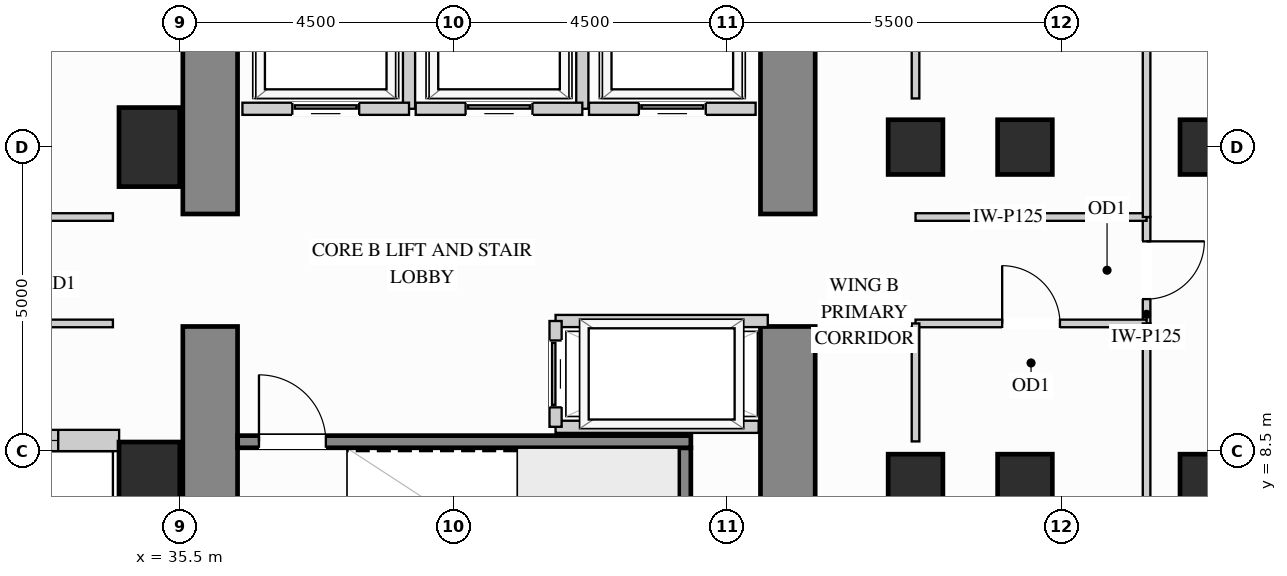
"""IFC4 building model, lengths in metres.
Left out: names, types, materials, properties, quantities, classifications, styles, units other than length and angle.
Written with IfcOpenShell. Run it as: python <this file> out.ifc"""

import sys

from ifc_helpers import new_model, si_unit, direction, frame, frame_2d, origin, origin_2d, place, context, subcontext, project, spatial, rectangle, extrude, source, transform, mapped, element, fill, save


model = new_model("IFC4")
c1 = context("Model", 3, precision=1e-05, world=origin(), true_north=direction((0.0, 1.0)))
c2 = subcontext(c1, "Body", "Model", "MODEL_VIEW")
j1 = project(units=[si_unit("LENGTHUNIT", "METRE"), si_unit("PLANEANGLEUNIT", "RADIAN")], contexts=[c1])
p1 = place(None, origin())
s1 = spatial("IfcSite", under=j1, at=p1, CompositionType="ELEMENT")
p2 = place(p1, origin())
s2 = spatial("IfcBuilding", under=s1, at=p2, CompositionType="ELEMENT")
p3 = place(p2, frame((0.0, 0.0, 47.7)))
s3 = spatial("IfcBuildingStorey", under=s2, at=p3, CompositionType="ELEMENT", Elevation=47.7)
m1 = source(origin(), c2, "Body", "SweptSolid", [
    extrude(rectangle(XDim=0.9, YDim=0.9, at=origin_2d()), origin(), (0.0, 0.0, 1.0), 3.38),
])
for number, where, z_axis, x_axis in (
    (1, (47.6, 13.5, 0.0), (0.0, 0.0, 1.0), (1.0, 0.0, 0.0)),
    (2, (47.6, 8.0, 0.0), (0.0, 0.0, 1.0), (1.0, 0.0, 0.0)),
    (3, (49.4, 13.5, 0.0), (0.0, 0.0, 1.0), (1.0, 0.0, 0.0)),
    (4, (49.4, 8.0, 0.0), (0.0, 0.0, 1.0), (1.0, 0.0, 0.0)),
    (5, (52.4, 13.5, 0.0), (0.0, 0.0, 1.0), (1.0, 0.0, 0.0)),
    (6, (52.4, 8.0, 0.0), (0.0, 0.0, 1.0), (1.0, 0.0, 0.0)),
):
    element("IfcColumn", number, at=place(p3, frame(where, z_axis=z_axis, x_axis=x_axis)), inside=s3, PredefinedType="COLUMN", context=c2, shape_type="MappedRepresentation", body=[
        mapped(m1, transform((0.0, 0.0, 0.0), x_axis=(1.0, 0.0, 0.0), y_axis=(0.0, 1.0, 0.0), z_axis=(0.0, 0.0, 1.0))),
    ])
m2 = source(origin(), c2, "Body", "SweptSolid", [
    extrude(rectangle(XDim=1.0, YDim=1.3, at=origin_2d()), origin(), (0.0, 0.0, 1.0), 3.38),
])
for number, where, z_axis, x_axis in (
    (7, (35.0, 13.5, 0.0), (0.0, 0.0, 1.0), (1.0, 0.0, 0.0)),
    (8, (35.0, 8.0, 0.0), (0.0, 0.0, 1.0), (1.0, 0.0, 0.0)),
):
    element("IfcColumn", number, at=place(p3, frame(where, z_axis=z_axis, x_axis=x_axis)), inside=s3, PredefinedType="COLUMN", context=c2, shape_type="MappedRepresentation", body=[
        mapped(m2, transform((0.0, 0.0, 0.0), x_axis=(1.0, 0.0, 0.0), y_axis=(0.0, 1.0, 0.0), z_axis=(0.0, 0.0, 1.0))),
    ])
m3 = source(origin(), c2, "Body", "SweptSolid", [
    extrude(rectangle(XDim=5.6, YDim=0.9, at=frame_2d((2.8, 0.0))), origin(), (0.0, 0.0, 1.0), 3.38),
])
p4 = place(p3, frame((45.5, 4.95, 0.0), z_axis=(0.0, 0.0, 1.0), x_axis=(0.0, 1.0, 0.0)))
e9 = element("IfcWall", 9, at=p4, inside=s3, PredefinedType="SHEAR", context=c2, shape_type="MappedRepresentation", body=[
    mapped(m3, transform((0.0, 0.0, 0.0), x_axis=(1.0, 0.0, 0.0), y_axis=(0.0, 1.0, 0.0), z_axis=(0.0, 0.0, 1.0))),
])
m4 = source(origin(), c2, "Body", "SweptSolid", [
    extrude(rectangle(XDim=3.65, YDim=0.9, at=frame_2d((1.825, 0.0))), origin(), (0.0, 0.0, 1.0), 3.38),
])
p5 = place(p3, frame((45.5, 12.4, 0.0), z_axis=(0.0, 0.0, 1.0), x_axis=(0.0, 1.0, 0.0)))
e10 = element("IfcWall", 10, at=p5, inside=s3, PredefinedType="SHEAR", context=c2, shape_type="MappedRepresentation", body=[
    mapped(m4, transform((0.0, 0.0, 0.0), x_axis=(1.0, 0.0, 0.0), y_axis=(0.0, 1.0, 0.0), z_axis=(0.0, 0.0, 1.0))),
])
p6 = place(p3, frame((36.0, 4.95, 0.0), z_axis=(0.0, 0.0, 1.0), x_axis=(0.0, 1.0, 0.0)))
e11 = element("IfcWall", 11, at=p6, inside=s3, PredefinedType="SHEAR", context=c2, shape_type="MappedRepresentation", body=[
    mapped(m3, transform((0.0, 0.0, 0.0), x_axis=(1.0, 0.0, 0.0), y_axis=(0.0, 1.0, 0.0), z_axis=(0.0, 0.0, 1.0))),
])
p7 = place(p3, frame((36.0, 12.4, 0.0), z_axis=(0.0, 0.0, 1.0), x_axis=(0.0, 1.0, 0.0)))
e12 = element("IfcWall", 12, at=p7, inside=s3, PredefinedType="SHEAR", context=c2, shape_type="MappedRepresentation", body=[
    mapped(m4, transform((0.0, 0.0, 0.0), x_axis=(1.0, 0.0, 0.0), y_axis=(0.0, 1.0, 0.0), z_axis=(0.0, 0.0, 1.0))),
])
p8 = place(p3, frame((30.998, 8.675, 0.0), z_axis=(0.0, 0.0, 1.0), x_axis=(1.0, 0.0, 0.0)))
e13 = element("IfcWall", 13, at=p8, inside=s3, PredefinedType="SOLIDWALL", context=c2, shape_type="SweptSolid", body=[
    extrude(rectangle(XDim=3.504, YDim=0.35, at=frame_2d((1.752, 0.0))), origin(), (0.0, 0.0, 1.0), 3.365),
])
p9 = place(p8, frame((1.002, 0.0, 0.78)))
e14 = element("IfcOpeningElement", 14, at=p9, cuts=e13, PredefinedType="OPENING", context=c2, shape_type="SweptSolid", body=[
    extrude(rectangle(XDim=1.5, YDim=2.0, at=frame_2d((0.75, 1.0))), frame((0.0, 0.185, 0.0), z_axis=(0.0, -1.0, 0.0), x_axis=(1.0, 0.0, 0.0)), (0.0, 0.0, 1.0), 0.37),
])
p10 = place(p3, frame((51.4, 10.6, 0.0), z_axis=(0.0, 0.0, 1.0), x_axis=(0.0, 1.0, 0.0)))
e15 = element("IfcWall", 15, at=p10, inside=s3, PredefinedType="PARTITIONING", context=c2, shape_type="SweptSolid", body=[
    extrude(rectangle(XDim=1.75, YDim=0.125, at=frame_2d((0.875, 0.0))), origin(), (0.0, 0.0, 1.0), 3.365),
])
p11 = place(p10, frame((0.4, 0.0, 0.0)))
e16 = element("IfcOpeningElement", 16, at=p11, cuts=e15, PredefinedType="OPENING", context=c2, shape_type="SweptSolid", body=[
    extrude(rectangle(XDim=0.95, YDim=2.15, at=frame_2d((0.475, 1.075))), frame((0.0, 0.073, 0.0), z_axis=(0.0, -1.0, 0.0), x_axis=(1.0, 0.0, 0.0)), (0.0, 0.0, 1.0), 0.145),
])
m5 = source(origin(), c2, "Body", "SweptSolid", [
    extrude(rectangle(XDim=3.8, YDim=0.125, at=frame_2d((1.9, 0.0))), origin(), (0.0, 0.0, 1.0), 3.365),
])
p12 = place(p3, frame((47.6, 12.35, 0.0), z_axis=(0.0, 0.0, 1.0), x_axis=(1.0, 0.0, 0.0)))
e17 = element("IfcWall", 17, at=p12, inside=s3, PredefinedType="PARTITIONING", context=c2, shape_type="MappedRepresentation", body=[
    mapped(m5, transform((0.0, 0.0, 0.0), x_axis=(1.0, 0.0, 0.0), y_axis=(0.0, 1.0, 0.0), z_axis=(0.0, 0.0, 1.0))),
])
p13 = place(p3, frame((47.6, 10.6, 0.0), z_axis=(0.0, 0.0, 1.0), x_axis=(1.0, 0.0, 0.0)))
e18 = element("IfcWall", 18, at=p13, inside=s3, PredefinedType="PARTITIONING", context=c2, shape_type="SweptSolid", body=[
    extrude(rectangle(XDim=3.8, YDim=0.125, at=frame_2d((1.9, 0.0))), origin(), (0.0, 0.0, 1.0), 2.67),
])
p14 = place(p13, frame((1.425, 0.0, 0.0)))
e19 = element("IfcOpeningElement", 19, at=p14, cuts=e18, PredefinedType="OPENING", context=c2, shape_type="SweptSolid", body=[
    extrude(rectangle(XDim=0.95, YDim=2.15, at=frame_2d((0.475, 1.075))), frame((0.0, 0.073, 0.0), z_axis=(0.0, -1.0, 0.0), x_axis=(1.0, 0.0, 0.0)), (0.0, 0.0, 1.0), 0.145),
])
m6 = source(origin(), c2, "Body", "SweptSolid", [
    extrude(rectangle(XDim=3.45, YDim=0.125, at=frame_2d((1.725, 0.0))), origin(), (0.0, 0.0, 1.0), 3.365),
])
p15 = place(p3, frame((51.4, 7.15, 0.0), z_axis=(0.0, 0.0, 1.0), x_axis=(0.0, 1.0, 0.0)))
e20 = element("IfcWall", 20, at=p15, inside=s3, PredefinedType="PARTITIONING", context=c2, shape_type="MappedRepresentation", body=[
    mapped(m6, transform((0.0, 0.0, 0.0), x_axis=(1.0, 0.0, 0.0), y_axis=(0.0, 1.0, 0.0), z_axis=(0.0, 0.0, 1.0))),
])
m7 = source(origin(), c2, "Body", "SweptSolid", [
    extrude(rectangle(XDim=9.79, YDim=0.125, at=frame_2d((4.895, 0.0))), origin(), (0.0, 0.0, 1.0), 3.365),
])
p16 = place(p3, frame((51.4, 12.35, 0.0), z_axis=(0.0, 0.0, 1.0), x_axis=(0.0, 1.0, 0.0)))
e21 = element("IfcWall", 21, at=p16, inside=s3, PredefinedType="PARTITIONING", context=c2, shape_type="MappedRepresentation", body=[
    mapped(m7, transform((0.0, 0.0, 0.0), x_axis=(1.0, 0.0, 0.0), y_axis=(0.0, 1.0, 0.0), z_axis=(0.0, 0.0, 1.0))),
])
m8 = source(origin(), c2, "Body", "SweptSolid", [
    extrude(rectangle(XDim=1.94, YDim=0.125, at=frame_2d((0.97, 0.0))), origin(), (0.0, 0.0, 1.0), 2.67),
])
p17 = place(p3, frame((47.6, 8.66, 0.0), z_axis=(0.0, 0.0, 1.0), x_axis=(0.0, 1.0, 0.0)))
e22 = element("IfcWall", 22, at=p17, inside=s3, PredefinedType="PARTITIONING", context=c2, shape_type="MappedRepresentation", body=[
    mapped(m8, transform((0.0, 0.0, 0.0), x_axis=(1.0, 0.0, 0.0), y_axis=(0.0, 1.0, 0.0), z_axis=(0.0, 0.0, 1.0))),
])
m9 = source(origin(), c2, "Body", "SweptSolid", [
    extrude(rectangle(XDim=2.44, YDim=0.125, at=frame_2d((1.22, 0.0))), origin(), (0.0, 0.0, 1.0), 2.67),
])
p18 = place(p3, frame((47.6, 14.3, 0.0), z_axis=(0.0, 0.0, 1.0), x_axis=(0.0, 1.0, 0.0)))
e23 = element("IfcWall", 23, at=p18, inside=s3, PredefinedType="PARTITIONING", context=c2, shape_type="MappedRepresentation", body=[
    mapped(m9, transform((0.0, 0.0, 0.0), x_axis=(1.0, 0.0, 0.0), y_axis=(0.0, 1.0, 0.0), z_axis=(0.0, 0.0, 1.0))),
])
p19 = place(p3, frame((29.85, 12.35, 0.0), z_axis=(0.0, 0.0, 1.0), x_axis=(1.0, 0.0, 0.0)))
e24 = element("IfcWall", 24, at=p19, inside=s3, PredefinedType="PARTITIONING", context=c2, shape_type="SweptSolid", body=[
    extrude(rectangle(XDim=4.55, YDim=0.125, at=frame_2d((2.275, 0.0))), origin(), (0.0, 0.0, 1.0), 3.365),
])
p20 = place(p19, frame((1.8, 0.0, 0.0)))
e25 = element("IfcOpeningElement", 25, at=p20, cuts=e24, PredefinedType="OPENING", context=c2, shape_type="SweptSolid", body=[
    extrude(rectangle(XDim=0.95, YDim=2.15, at=frame_2d((0.475, 1.075))), frame((0.0, 0.073, 0.0), z_axis=(0.0, -1.0, 0.0), x_axis=(1.0, 0.0, 0.0)), (0.0, 0.0, 1.0), 0.145),
])
p21 = place(p3, frame((26.95, 10.6, 0.0), z_axis=(0.0, 0.0, 1.0), x_axis=(1.0, 0.0, 0.0)))
e26 = element("IfcWall", 26, at=p21, inside=s3, PredefinedType="PARTITIONING", context=c2, shape_type="SweptSolid", body=[
    extrude(rectangle(XDim=7.45, YDim=0.125, at=frame_2d((3.725, 0.0))), origin(), (0.0, 0.0, 1.0), 3.365),
])
p22 = place(p21, frame((4.683, 0.0, 0.0)))
e27 = element("IfcOpeningElement", 27, at=p22, cuts=e26, PredefinedType="OPENING", context=c2, shape_type="SweptSolid", body=[
    extrude(rectangle(XDim=0.95, YDim=2.15, at=frame_2d((0.475, 1.075))), frame((0.0, 0.073, 0.0), z_axis=(0.0, -1.0, 0.0), x_axis=(1.0, 0.0, 0.0)), (0.0, 0.0, 1.0), 0.145),
])
m10 = source(origin(), c2, "Body", "SweptSolid", [
    extrude(rectangle(XDim=1.89, YDim=0.2, at=frame_2d((0.945, 0.0))), origin(), (0.0, 0.0, 1.0), 3.365),
])
p23 = place(p3, frame((39.27, 14.13, 0.0), z_axis=(0.0, 0.0, 1.0), x_axis=(0.0, 1.0, 0.0)))
e28 = element("IfcWall", 28, at=p23, inside=s3, PredefinedType="PARTITIONING", context=c2, shape_type="MappedRepresentation", body=[
    mapped(m10, transform((0.0, 0.0, 0.0), x_axis=(1.0, 0.0, 0.0), y_axis=(0.0, 1.0, 0.0), z_axis=(0.0, 0.0, 1.0))),
])
p24 = place(p3, frame((36.53, 14.13, 0.0), z_axis=(0.0, 0.0, 1.0), x_axis=(1.0, 0.0, 0.0)))
e29 = element("IfcWall", 29, at=p24, inside=s3, PredefinedType="PARTITIONING", context=c2, shape_type="SweptSolid", body=[
    extrude(rectangle(XDim=2.74, YDim=0.2, at=frame_2d((1.37, 0.0))), origin(), (0.0, 0.0, 1.0), 3.365),
])
p25 = place(p24, frame((0.82, 0.0, 0.0)))
e30 = element("IfcOpeningElement", 30, at=p25, cuts=e29, PredefinedType="OPENING", context=c2, shape_type="SweptSolid", body=[
    extrude(rectangle(XDim=1.1, YDim=2.2, at=frame_2d((0.55, 1.1))), frame((0.0, 0.11, 0.0), z_axis=(0.0, -1.0, 0.0), x_axis=(1.0, 0.0, 0.0)), (0.0, 0.0, 1.0), 0.22),
])
p26 = place(p3, frame((42.12, 14.13, 0.0), z_axis=(0.0, 0.0, 1.0), x_axis=(0.0, 1.0, 0.0)))
e31 = element("IfcWall", 31, at=p26, inside=s3, PredefinedType="PARTITIONING", context=c2, shape_type="MappedRepresentation", body=[
    mapped(m10, transform((0.0, 0.0, 0.0), x_axis=(1.0, 0.0, 0.0), y_axis=(0.0, 1.0, 0.0), z_axis=(0.0, 0.0, 1.0))),
])
p27 = place(p3, frame((39.38, 14.13, 0.0), z_axis=(0.0, 0.0, 1.0), x_axis=(1.0, 0.0, 0.0)))
e32 = element("IfcWall", 32, at=p27, inside=s3, PredefinedType="PARTITIONING", context=c2, shape_type="SweptSolid", body=[
    extrude(rectangle(XDim=2.74, YDim=0.2, at=frame_2d((1.37, 0.0))), origin(), (0.0, 0.0, 1.0), 3.365),
])
p28 = place(p27, frame((0.82, 0.0, 0.0)))
e33 = element("IfcOpeningElement", 33, at=p28, cuts=e32, PredefinedType="OPENING", context=c2, shape_type="SweptSolid", body=[
    extrude(rectangle(XDim=1.1, YDim=2.2, at=frame_2d((0.55, 1.1))), frame((0.0, 0.11, 0.0), z_axis=(0.0, -1.0, 0.0), x_axis=(1.0, 0.0, 0.0)), (0.0, 0.0, 1.0), 0.22),
])
p29 = place(p3, frame((42.23, 14.13, 0.0), z_axis=(0.0, 0.0, 1.0), x_axis=(1.0, 0.0, 0.0)))
e34 = element("IfcWall", 34, at=p29, inside=s3, PredefinedType="PARTITIONING", context=c2, shape_type="SweptSolid", body=[
    extrude(rectangle(XDim=2.74, YDim=0.2, at=frame_2d((1.37, 0.0))), origin(), (0.0, 0.0, 1.0), 3.365),
])
p30 = place(p29, frame((0.82, 0.0, 0.0)))
e35 = element("IfcOpeningElement", 35, at=p30, cuts=e34, PredefinedType="OPENING", context=c2, shape_type="SweptSolid", body=[
    extrude(rectangle(XDim=1.1, YDim=2.2, at=frame_2d((0.55, 1.1))), frame((0.0, 0.11, 0.0), z_axis=(0.0, -1.0, 0.0), x_axis=(1.0, 0.0, 0.0)), (0.0, 0.0, 1.0), 0.22),
])
m11 = source(origin(), c2, "Body", "SweptSolid", [
    extrude(rectangle(XDim=3.49, YDim=0.2, at=frame_2d((1.745, 0.0))), origin(), (0.0, 0.0, 1.0), 3.365),
])
p31 = place(p3, frame((41.68, 10.64, 0.0), z_axis=(0.0, 0.0, 1.0), x_axis=(1.0, 0.0, 0.0)))
e36 = element("IfcWall", 36, at=p31, inside=s3, PredefinedType="PARTITIONING", context=c2, shape_type="MappedRepresentation", body=[
    mapped(m11, transform((0.0, 0.0, 0.0), x_axis=(1.0, 0.0, 0.0), y_axis=(0.0, 1.0, 0.0), z_axis=(0.0, 0.0, 1.0))),
])
m12 = source(origin(), c2, "Body", "SweptSolid", [
    extrude(rectangle(XDim=3.34, YDim=0.2, at=frame_2d((1.67, 0.0))), origin(), (0.0, 0.0, 1.0), 3.365),
])
p32 = place(p3, frame((41.68, 8.9, 0.0), z_axis=(0.0, 0.0, 1.0), x_axis=(1.0, 0.0, 0.0)))
e37 = element("IfcWall", 37, at=p32, inside=s3, PredefinedType="PARTITIONING", context=c2, shape_type="MappedRepresentation", body=[
    mapped(m12, transform((0.0, 0.0, 0.0), x_axis=(1.0, 0.0, 0.0), y_axis=(0.0, 1.0, 0.0), z_axis=(0.0, 0.0, 1.0))),
])
p33 = place(p3, frame((41.68, 8.9, 0.0), z_axis=(0.0, 0.0, 1.0), x_axis=(0.0, 1.0, 0.0)))
e38 = element("IfcWall", 38, at=p33, inside=s3, PredefinedType="PARTITIONING", context=c2, shape_type="SweptSolid", body=[
    extrude(rectangle(XDim=1.74, YDim=0.2, at=frame_2d((0.87, 0.0))), origin(), (0.0, 0.0, 1.0), 3.365),
])
p34 = place(p33, frame((0.32, 0.0, 0.0)))
e39 = element("IfcOpeningElement", 39, at=p34, cuts=e38, PredefinedType="OPENING", context=c2, shape_type="SweptSolid", body=[
    extrude(rectangle(XDim=1.1, YDim=2.2, at=frame_2d((0.55, 1.1))), frame((0.0, 0.11, 0.0), z_axis=(0.0, -1.0, 0.0), x_axis=(1.0, 0.0, 0.0)), (0.0, 0.0, 1.0), 0.22),
])
m13 = source(origin(), c2, "Body", "SweptSolid", [
    extrude(rectangle(XDim=3.603, YDim=0.2, at=frame_2d((1.802, 0.0))), origin(), (0.0, 0.0, 1.0), 3.38),
])
p35 = place(p3, frame((43.805, 4.952, 0.0), z_axis=(0.0, 0.0, 1.0), x_axis=(0.0, 1.0, 0.0)))
e40 = element("IfcWall", 40, at=p35, inside=s3, PredefinedType="SHEAR", context=c2, shape_type="MappedRepresentation", body=[
    mapped(m13, transform((0.0, 0.0, 0.0), x_axis=(1.0, 0.0, 0.0), y_axis=(0.0, 1.0, 0.0), z_axis=(0.0, 0.0, 1.0))),
])
p36 = place(p3, frame((36.452, 8.655, 0.0), z_axis=(0.0, 0.0, 1.0), x_axis=(1.0, 0.0, 0.0)))
e41 = element("IfcWall", 41, at=p36, inside=s3, PredefinedType="SHEAR", context=c2, shape_type="SweptSolid", body=[
    extrude(rectangle(XDim=7.453, YDim=0.2, at=frame_2d((3.727, 0.0))), origin(), (0.0, 0.0, 1.0), 3.38),
])
p37 = place(p36, frame((0.35, 0.0, 0.0)))
e42 = element("IfcOpeningElement", 42, at=p37, cuts=e41, PredefinedType="OPENING", context=c2, shape_type="SweptSolid", body=[
    extrude(rectangle(XDim=1.1, YDim=2.15, at=frame_2d((0.55, 1.075))), frame((0.0, 0.11, 0.0), z_axis=(0.0, -1.0, 0.0), x_axis=(1.0, 0.0, 0.0)), (0.0, 0.0, 1.0), 0.22),
])
m14 = source(origin(), c2, "Body", "SweptSolid", [
    extrude(rectangle(XDim=1.1, YDim=2.2, at=frame_2d((0.55, 1.1))), frame((0.0, 0.025, 0.0), z_axis=(0.0, -1.0, 0.0), x_axis=(1.0, 0.0, 0.0)), (0.0, 0.0, 1.0), 0.05),
])
p38 = place(p25, origin())
e43 = element("IfcDoor", 43, at=p38, inside=s3, OperationType="SLIDING_TO_LEFT", PredefinedType="DOOR", context=c2, shape_type="MappedRepresentation", body=[
    mapped(m14, transform((0.0, 0.0, 0.0), x_axis=(1.0, 0.0, 0.0), y_axis=(0.0, 1.0, 0.0), z_axis=(0.0, 0.0, 1.0))),
])
fill(e30, e43)
p39 = place(p28, origin())
e44 = element("IfcDoor", 44, at=p39, inside=s3, OperationType="SLIDING_TO_LEFT", PredefinedType="DOOR", context=c2, shape_type="MappedRepresentation", body=[
    mapped(m14, transform((0.0, 0.0, 0.0), x_axis=(1.0, 0.0, 0.0), y_axis=(0.0, 1.0, 0.0), z_axis=(0.0, 0.0, 1.0))),
])
fill(e33, e44)
p40 = place(p30, origin())
e45 = element("IfcDoor", 45, at=p40, inside=s3, OperationType="SLIDING_TO_LEFT", PredefinedType="DOOR", context=c2, shape_type="MappedRepresentation", body=[
    mapped(m14, transform((0.0, 0.0, 0.0), x_axis=(1.0, 0.0, 0.0), y_axis=(0.0, 1.0, 0.0), z_axis=(0.0, 0.0, 1.0))),
])
fill(e35, e45)
p41 = place(p34, origin())
e46 = element("IfcDoor", 46, at=p41, inside=s3, OperationType="SLIDING_TO_LEFT", PredefinedType="DOOR", context=c2, shape_type="MappedRepresentation", body=[
    mapped(m14, transform((0.0, 0.0, 0.0), x_axis=(1.0, 0.0, 0.0), y_axis=(0.0, 1.0, 0.0), z_axis=(0.0, 0.0, 1.0))),
])
fill(e39, e46)
m15 = source(origin(), c2, "Body", "SweptSolid", [
    extrude(rectangle(XDim=0.95, YDim=2.15, at=frame_2d((0.475, 1.075))), frame((0.0, 0.025, 0.0), z_axis=(0.0, -1.0, 0.0), x_axis=(1.0, 0.0, 0.0)), (0.0, 0.0, 1.0), 0.05),
])
p42 = place(p14, origin())
e47 = element("IfcDoor", 47, at=p42, inside=s3, OperationType="SINGLE_SWING_LEFT", PredefinedType="DOOR", context=c2, shape_type="MappedRepresentation", body=[
    mapped(m15, transform((0.0, 0.0, 0.0), x_axis=(1.0, 0.0, 0.0), y_axis=(0.0, 1.0, 0.0), z_axis=(0.0, 0.0, 1.0))),
])
fill(e19, e47)
p43 = place(p11, origin())
e48 = element("IfcDoor", 48, at=p43, inside=s3, OperationType="SINGLE_SWING_RIGHT", PredefinedType="DOOR", context=c2, shape_type="MappedRepresentation", body=[
    mapped(m15, transform((0.0, 0.0, 0.0), x_axis=(1.0, 0.0, 0.0), y_axis=(0.0, 1.0, 0.0), z_axis=(0.0, 0.0, 1.0))),
])
fill(e16, e48)
m16 = source(origin(), c2, "Body", "SweptSolid", [
    extrude(rectangle(XDim=1.1, YDim=2.15, at=frame_2d((0.55, 1.075))), frame((0.0, 0.025, 0.0), z_axis=(0.0, -1.0, 0.0), x_axis=(1.0, 0.0, 0.0)), (0.0, 0.0, 1.0), 0.05),
])
p44 = place(p37, origin())
e49 = element("IfcDoor", 49, at=p44, inside=s3, OperationType="SINGLE_SWING_LEFT", PredefinedType="DOOR", context=c2, shape_type="MappedRepresentation", body=[
    mapped(m16, transform((0.0, 0.0, 0.0), x_axis=(1.0, 0.0, 0.0), y_axis=(0.0, 1.0, 0.0), z_axis=(0.0, 0.0, 1.0))),
])
fill(e42, e49)
m17 = source(origin(), c2, "Body", "SweptSolid", [
    extrude(rectangle(XDim=1.5, YDim=2.0, at=frame_2d((0.75, 1.0))), frame((0.0, 0.03, 0.0), z_axis=(0.0, -1.0, 0.0), x_axis=(1.0, 0.0, 0.0)), (0.0, 0.0, 1.0), 0.06),
])
p45 = place(p9, origin())
e50 = element("IfcWindow", 50, at=p45, inside=s3, PartitioningType="SINGLE_PANEL", PredefinedType="WINDOW", context=c2, shape_type="MappedRepresentation", body=[
    mapped(m17, transform((0.0, 0.0, 0.0), x_axis=(1.0, 0.0, 0.0), y_axis=(0.0, 1.0, 0.0), z_axis=(0.0, 0.0, 1.0))),
])
fill(e14, e50)
save(model, sys.argv[1])
